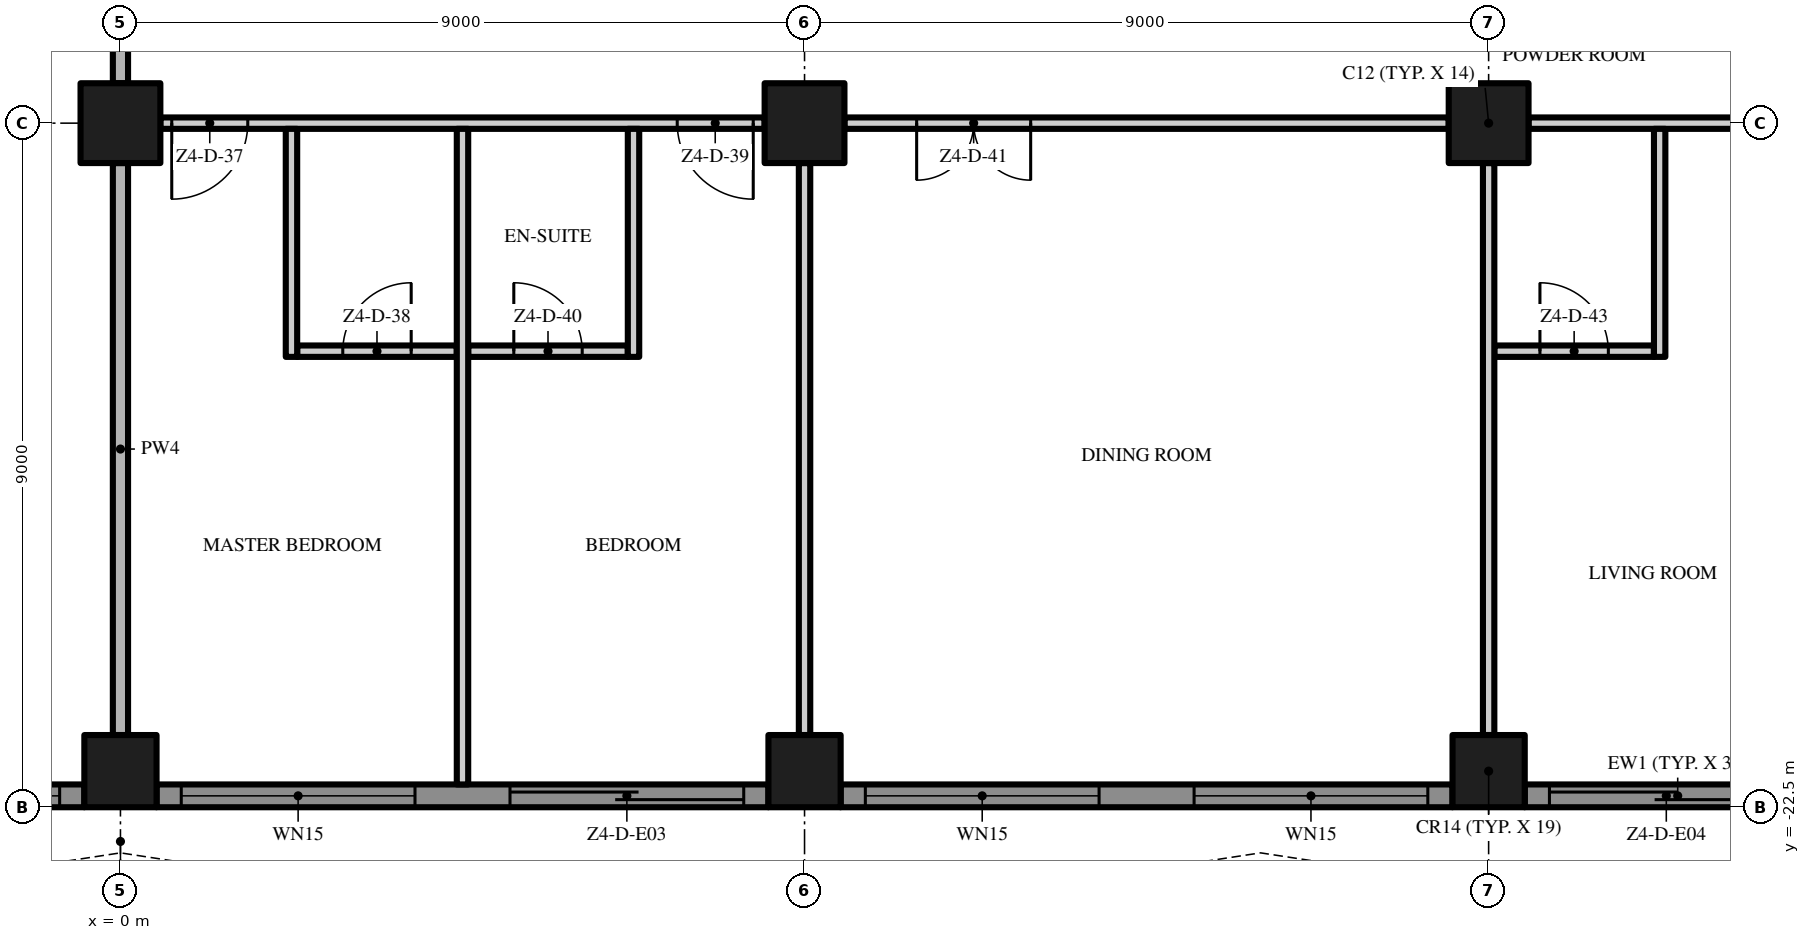
"""IFC4 building model, lengths in metres.
Left out: names, types, materials, properties, quantities, classifications, styles, units other than length and angle.
Written with IfcOpenShell. Run it as: python <this file> out.ifc"""

import sys

from ifc_helpers import new_model, si_unit, direction, frame, frame_2d, origin, origin_2d, place, context, subcontext, project, spatial, polyline, rectangle, outline, extrude, element, fill, save


model = new_model("IFC4")
c1 = context("Model", 3, precision=1e-05, world=origin(), true_north=direction((0.0, 1.0)))
c2 = subcontext(c1, "Body", "Model", "MODEL_VIEW")
j1 = project(units=[si_unit("LENGTHUNIT", "METRE"), si_unit("PLANEANGLEUNIT", "RADIAN")], contexts=[c1])
p1 = place(None, origin())
s1 = spatial("IfcSite", under=j1, at=p1, CompositionType="ELEMENT")
p2 = place(p1, origin())
s2 = spatial("IfcBuilding", under=s1, at=p2, CompositionType="ELEMENT")
p3 = place(p2, frame((0.0, 0.0, 218.6)))
s3 = spatial("IfcBuildingStorey", under=s2, at=p3, CompositionType="ELEMENT", Elevation=218.6)
p4 = place(p3, frame((0.0, -13.5, 0.0), z_axis=(0.0, 0.0, 1.0), x_axis=(1.0, 0.0, 0.0)))
e1 = element("IfcColumn", 1, at=p4, inside=s3, PredefinedType="COLUMN", context=c2, shape_type="SweptSolid", body=[
    extrude(rectangle(XDim=1.05, YDim=1.05, at=origin_2d()), origin(), (0.0, 0.0, 1.0), 3.5),
])
p5 = place(p3, frame((0.0, -22.025, 0.0), z_axis=(0.0, 0.0, 1.0), x_axis=(1.0, 0.0, 0.0)))
e2 = element("IfcColumn", 2, at=p5, inside=s3, PredefinedType="COLUMN", context=c2, shape_type="SweptSolid", body=[
    extrude(rectangle(XDim=0.95, YDim=0.95, at=origin_2d()), origin(), (0.0, 0.0, 1.0), 3.5),
])
p6 = place(p3, frame((18.0, -13.5, 0.0), z_axis=(0.0, 0.0, 1.0), x_axis=(1.0, 0.0, 0.0)))
e3 = element("IfcColumn", 3, at=p6, inside=s3, PredefinedType="COLUMN", context=c2, shape_type="SweptSolid", body=[
    extrude(rectangle(XDim=1.05, YDim=1.05, at=origin_2d()), origin(), (0.0, 0.0, 1.0), 3.5),
])
p7 = place(p3, frame((18.0, -22.025, 0.0), z_axis=(0.0, 0.0, 1.0), x_axis=(1.0, 0.0, 0.0)))
e4 = element("IfcColumn", 4, at=p7, inside=s3, PredefinedType="COLUMN", context=c2, shape_type="SweptSolid", body=[
    extrude(rectangle(XDim=0.95, YDim=0.95, at=origin_2d()), origin(), (0.0, 0.0, 1.0), 3.5),
])
p8 = place(p3, frame((9.0, -13.5, 0.0), z_axis=(0.0, 0.0, 1.0), x_axis=(1.0, 0.0, 0.0)))
e5 = element("IfcColumn", 5, at=p8, inside=s3, PredefinedType="COLUMN", context=c2, shape_type="SweptSolid", body=[
    extrude(rectangle(XDim=1.05, YDim=1.05, at=origin_2d()), origin(), (0.0, 0.0, 1.0), 3.5),
])
p9 = place(p3, frame((9.0, -22.025, 0.0), z_axis=(0.0, 0.0, 1.0), x_axis=(1.0, 0.0, 0.0)))
e6 = element("IfcColumn", 6, at=p9, inside=s3, PredefinedType="COLUMN", context=c2, shape_type="SweptSolid", body=[
    extrude(rectangle(XDim=0.95, YDim=0.95, at=origin_2d()), origin(), (0.0, 0.0, 1.0), 3.5),
])
p10 = place(p3, frame((-0.475, -22.35, 0.0), z_axis=(0.0, 0.0, 1.0), x_axis=(-1.0, 0.0, 0.0)))
e7 = element("IfcWall", 7, at=p10, inside=s3, PredefinedType="SOLIDWALL", context=c2, shape_type="SweptSolid", body=[
    extrude(rectangle(XDim=8.05, YDim=0.3, at=frame_2d((4.025, 0.0))), origin(), (0.0, 0.0, 1.0), 3.5),
])
p11 = place(p10, frame((4.65, 0.0, 0.0)))
e8 = element("IfcOpeningElement", 8, at=p11, cuts=e7, PredefinedType="OPENING", context=c2, shape_type="SweptSolid", body=[
    extrude(rectangle(XDim=3.075, YDim=2.4, at=frame_2d((1.538, 1.2))), frame((0.0, 0.16, 0.0), z_axis=(0.0, -1.0, 0.0), x_axis=(1.0, 0.0, 0.0)), (0.0, 0.0, 1.0), 0.32),
])
p12 = place(p10, frame((0.325, 0.0, 0.45)))
e9 = element("IfcOpeningElement", 9, at=p12, cuts=e7, PredefinedType="OPENING", context=c2, shape_type="SweptSolid", body=[
    extrude(rectangle(XDim=3.075, YDim=2.65, at=frame_2d((1.538, 1.325))), frame((0.0, 0.16, 0.0), z_axis=(0.0, -1.0, 0.0), x_axis=(1.0, 0.0, 0.0)), (0.0, 0.0, 1.0), 0.32),
])
p13 = place(p3, frame((8.525, -22.35, 0.0), z_axis=(0.0, 0.0, 1.0), x_axis=(-1.0, 0.0, 0.0)))
e10 = element("IfcWall", 10, at=p13, inside=s3, PredefinedType="SOLIDWALL", context=c2, shape_type="SweptSolid", body=[
    extrude(rectangle(XDim=8.05, YDim=0.3, at=frame_2d((4.025, 0.0))), origin(), (0.0, 0.0, 1.0), 3.5),
])
p14 = place(p13, frame((4.65, 0.0, 0.45)))
e11 = element("IfcOpeningElement", 11, at=p14, cuts=e10, PredefinedType="OPENING", context=c2, shape_type="SweptSolid", body=[
    extrude(rectangle(XDim=3.075, YDim=2.65, at=frame_2d((1.538, 1.325))), frame((0.0, 0.16, 0.0), z_axis=(0.0, -1.0, 0.0), x_axis=(1.0, 0.0, 0.0)), (0.0, 0.0, 1.0), 0.32),
])
p15 = place(p13, frame((0.325, 0.0, 0.0)))
e12 = element("IfcOpeningElement", 12, at=p15, cuts=e10, PredefinedType="OPENING", context=c2, shape_type="SweptSolid", body=[
    extrude(rectangle(XDim=3.075, YDim=2.4, at=frame_2d((1.538, 1.2))), frame((0.0, 0.16, 0.0), z_axis=(0.0, -1.0, 0.0), x_axis=(1.0, 0.0, 0.0)), (0.0, 0.0, 1.0), 0.32),
])
p16 = place(p3, frame((17.525, -22.35, 0.0), z_axis=(0.0, 0.0, 1.0), x_axis=(-1.0, 0.0, 0.0)))
e13 = element("IfcWall", 13, at=p16, inside=s3, PredefinedType="SOLIDWALL", context=c2, shape_type="SweptSolid", body=[
    extrude(rectangle(XDim=8.05, YDim=0.3, at=frame_2d((4.025, 0.0))), origin(), (0.0, 0.0, 1.0), 3.5),
])
p17 = place(p16, frame((4.65, 0.0, 0.45)))
e14 = element("IfcOpeningElement", 14, at=p17, cuts=e13, PredefinedType="OPENING", context=c2, shape_type="SweptSolid", body=[
    extrude(rectangle(XDim=3.075, YDim=2.65, at=frame_2d((1.538, 1.325))), frame((0.0, 0.16, 0.0), z_axis=(0.0, -1.0, 0.0), x_axis=(1.0, 0.0, 0.0)), (0.0, 0.0, 1.0), 0.32),
])
p18 = place(p16, frame((0.325, 0.0, 0.45)))
e15 = element("IfcOpeningElement", 15, at=p18, cuts=e13, PredefinedType="OPENING", context=c2, shape_type="SweptSolid", body=[
    extrude(rectangle(XDim=3.075, YDim=2.65, at=frame_2d((1.538, 1.325))), frame((0.0, 0.16, 0.0), z_axis=(0.0, -1.0, 0.0), x_axis=(1.0, 0.0, 0.0)), (0.0, 0.0, 1.0), 0.32),
])
p19 = place(p3, frame((22.5, -22.35, 0.0), z_axis=(0.0, 0.0, 1.0), x_axis=(-1.0, 0.0, 0.0)))
e16 = element("IfcWall", 16, at=p19, inside=s3, PredefinedType="SOLIDWALL", context=c2, shape_type="SweptSolid", body=[
    extrude(rectangle(XDim=4.025, YDim=0.3, at=frame_2d((2.013, 0.0))), origin(), (0.0, 0.0, 1.0), 3.5),
])
p20 = place(p19, frame((0.625, 0.0, 0.0)))
e17 = element("IfcOpeningElement", 17, at=p20, cuts=e16, PredefinedType="OPENING", context=c2, shape_type="SweptSolid", body=[
    extrude(rectangle(XDim=3.075, YDim=2.4, at=frame_2d((1.538, 1.2))), frame((0.0, 0.16, 0.0), z_axis=(0.0, -1.0, 0.0), x_axis=(1.0, 0.0, 0.0)), (0.0, 0.0, 1.0), 0.32),
])
p21 = place(p3, origin())
e18 = element("IfcWall", 18, at=p21, inside=s3, PredefinedType="USERDEFINED", context=c2, shape_type="SweptSolid", body=[
    extrude(outline(polyline([(-22.5, -25.5), (-21.0, -25.271), (-19.5, -24.671), (-18.0, -23.929), (-16.5, -23.329), (-15.0, -23.1), (-13.5, -23.329), (-12.0, -23.929), (-10.5, -24.671), (-9.0, -25.271), (-7.5, -25.5), (-6.0, -25.271), (-4.5, -24.671), (-3.0, -23.929), (-1.5, -23.329), (0.0, -23.1), (1.5, -23.329), (3.0, -23.929), (4.5, -24.671), (6.0, -25.271), (7.5, -25.5), (9.0, -25.271), (10.5, -24.671), (12.0, -23.929), (13.5, -23.329), (15.0, -23.1), (16.5, -23.329), (18.0, -23.929), (19.5, -24.671), (21.0, -25.271), (22.5, -25.5), (22.538, -25.253), (21.066, -25.028), (19.602, -24.442), (18.102, -23.701), (16.566, -23.086), (15.0, -22.847), (13.434, -23.086), (11.898, -23.701), (10.398, -24.442), (8.934, -25.028), (7.5, -25.247), (6.066, -25.028), (4.602, -24.442), (3.102, -23.701), (1.566, -23.086), (0.0, -22.847), (-1.566, -23.086), (-3.102, -23.701), (-4.602, -24.442), (-6.066, -25.028), (-7.5, -25.247), (-8.934, -25.028), (-10.398, -24.442), (-11.898, -23.701), (-13.434, -23.086), (-15.0, -22.847), (-16.566, -23.086), (-18.102, -23.701), (-19.602, -24.442), (-21.066, -25.028), (-22.538, -25.253), (-22.5, -25.5)])), origin(), (0.0, 0.0, 1.0), 0.9),
])
p22 = place(p3, frame((2.325, -16.5, 0.0), z_axis=(0.0, 0.0, 1.0), x_axis=(1.0, 0.0, 0.0)))
e19 = element("IfcWall", 19, at=p22, inside=s3, PredefinedType="PARTITIONING", context=c2, shape_type="SweptSolid", body=[
    extrude(rectangle(XDim=2.1, YDim=0.15, at=frame_2d((1.05, 0.0))), origin(), (0.0, 0.0, 1.0), 3.5),
])
p23 = place(p22, frame((0.6, 0.0, 0.0)))
e20 = element("IfcOpeningElement", 20, at=p23, cuts=e19, PredefinedType="OPENING", context=c2, shape_type="SweptSolid", body=[
    extrude(rectangle(XDim=0.9, YDim=2.1, at=frame_2d((0.45, 1.05))), frame((0.0, 0.085, 0.0), z_axis=(0.0, -1.0, 0.0), x_axis=(1.0, 0.0, 0.0)), (0.0, 0.0, 1.0), 0.17),
])
p24 = place(p3, frame((4.575, -16.5, 0.0), z_axis=(0.0, 0.0, 1.0), x_axis=(1.0, 0.0, 0.0)))
e21 = element("IfcWall", 21, at=p24, inside=s3, PredefinedType="PARTITIONING", context=c2, shape_type="SweptSolid", body=[
    extrude(rectangle(XDim=2.1, YDim=0.15, at=frame_2d((1.05, 0.0))), origin(), (0.0, 0.0, 1.0), 3.5),
])
p25 = place(p24, frame((0.6, 0.0, 0.0)))
e22 = element("IfcOpeningElement", 22, at=p25, cuts=e21, PredefinedType="OPENING", context=c2, shape_type="SweptSolid", body=[
    extrude(rectangle(XDim=0.9, YDim=2.1, at=frame_2d((0.45, 1.05))), frame((0.0, 0.085, 0.0), z_axis=(0.0, -1.0, 0.0), x_axis=(1.0, 0.0, 0.0)), (0.0, 0.0, 1.0), 0.17),
])
p26 = place(p3, frame((18.075, -16.5, 0.0), z_axis=(0.0, 0.0, 1.0), x_axis=(1.0, 0.0, 0.0)))
e23 = element("IfcWall", 23, at=p26, inside=s3, PredefinedType="PARTITIONING", context=c2, shape_type="SweptSolid", body=[
    extrude(rectangle(XDim=2.1, YDim=0.15, at=frame_2d((1.05, 0.0))), origin(), (0.0, 0.0, 1.0), 3.5),
])
p27 = place(p26, frame((0.6, 0.0, 0.0)))
e24 = element("IfcOpeningElement", 24, at=p27, cuts=e23, PredefinedType="OPENING", context=c2, shape_type="SweptSolid", body=[
    extrude(rectangle(XDim=0.9, YDim=2.1, at=frame_2d((0.45, 1.05))), frame((0.0, 0.085, 0.0), z_axis=(0.0, -1.0, 0.0), x_axis=(1.0, 0.0, 0.0)), (0.0, 0.0, 1.0), 0.17),
])
p28 = place(p3, frame((8.475, -13.5, 0.0), z_axis=(0.0, 0.0, 1.0), x_axis=(-1.0, 0.0, 0.0)))
e25 = element("IfcWall", 25, at=p28, inside=s3, PredefinedType="PARTITIONING", context=c2, shape_type="SweptSolid", body=[
    extrude(rectangle(XDim=7.95, YDim=0.15, at=frame_2d((3.975, 0.0))), origin(), (0.0, 0.0, 1.0), 3.5),
])
p29 = place(p28, frame((6.8, 0.0, 0.0)))
e26 = element("IfcOpeningElement", 26, at=p29, cuts=e25, PredefinedType="OPENING", context=c2, shape_type="SweptSolid", body=[
    extrude(rectangle(XDim=1.0, YDim=2.4, at=frame_2d((0.5, 1.2))), frame((0.0, 0.085, 0.0), z_axis=(0.0, -1.0, 0.0), x_axis=(1.0, 0.0, 0.0)), (0.0, 0.0, 1.0), 0.17),
])
p30 = place(p28, frame((0.15, 0.0, 0.0)))
e27 = element("IfcOpeningElement", 27, at=p30, cuts=e25, PredefinedType="OPENING", context=c2, shape_type="SweptSolid", body=[
    extrude(rectangle(XDim=1.0, YDim=2.4, at=frame_2d((0.5, 1.2))), frame((0.0, 0.085, 0.0), z_axis=(0.0, -1.0, 0.0), x_axis=(1.0, 0.0, 0.0)), (0.0, 0.0, 1.0), 0.17),
])
p31 = place(p3, frame((17.475, -13.5, 0.0), z_axis=(0.0, 0.0, 1.0), x_axis=(-1.0, 0.0, 0.0)))
e28 = element("IfcWall", 28, at=p31, inside=s3, PredefinedType="PARTITIONING", context=c2, shape_type="SweptSolid", body=[
    extrude(rectangle(XDim=7.95, YDim=0.15, at=frame_2d((3.975, 0.0))), origin(), (0.0, 0.0, 1.0), 3.5),
])
p32 = place(p31, frame((5.5, 0.0, 0.0)))
e29 = element("IfcOpeningElement", 29, at=p32, cuts=e28, PredefinedType="OPENING", context=c2, shape_type="SweptSolid", body=[
    extrude(rectangle(XDim=1.5, YDim=2.4, at=frame_2d((0.75, 1.2))), frame((0.0, 0.085, 0.0), z_axis=(0.0, -1.0, 0.0), x_axis=(1.0, 0.0, 0.0)), (0.0, 0.0, 1.0), 0.17),
])
p33 = place(p3, frame((26.05, -13.5, 0.0), z_axis=(0.0, 0.0, 1.0), x_axis=(-1.0, 0.0, 0.0)))
e30 = element("IfcWall", 30, at=p33, inside=s3, PredefinedType="PARTITIONING", context=c2, shape_type="SweptSolid", body=[
    extrude(rectangle(XDim=7.525, YDim=0.15, at=frame_2d((3.763, 0.0))), origin(), (0.0, 0.0, 1.0), 3.5),
])
p34 = place(p33, frame((1.55, 0.0, 0.0)))
e31 = element("IfcOpeningElement", 31, at=p34, cuts=e30, PredefinedType="OPENING", context=c2, shape_type="SweptSolid", body=[
    extrude(rectangle(XDim=1.8, YDim=2.4, at=frame_2d((0.9, 1.2))), frame((0.0, 0.085, 0.0), z_axis=(0.0, -1.0, 0.0), x_axis=(1.0, 0.0, 0.0)), (0.0, 0.0, 1.0), 0.17),
])
p35 = place(p3, frame((0.0, -21.55, 0.0), z_axis=(0.0, 0.0, 1.0), x_axis=(0.0, 1.0, 0.0)))
e32 = element("IfcWall", 32, at=p35, inside=s3, PredefinedType="PARTITIONING", context=c2, shape_type="SweptSolid", body=[
    extrude(rectangle(XDim=7.525, YDim=0.2, at=frame_2d((3.763, 0.0))), origin(), (0.0, 0.0, 1.0), 3.5),
])
p36 = place(p3, frame((0.0, -12.975, 0.0), z_axis=(0.0, 0.0, 1.0), x_axis=(0.0, 1.0, 0.0)))
e33 = element("IfcWall", 33, at=p36, inside=s3, PredefinedType="PARTITIONING", context=c2, shape_type="SweptSolid", body=[
    extrude(rectangle(XDim=7.95, YDim=0.2, at=frame_2d((3.975, 0.0))), origin(), (0.0, 0.0, 1.0), 3.5),
])
p37 = place(p3, frame((2.25, -16.575, 0.0), z_axis=(0.0, 0.0, 1.0), x_axis=(0.0, 1.0, 0.0)))
e34 = element("IfcWall", 34, at=p37, inside=s3, PredefinedType="PARTITIONING", context=c2, shape_type="SweptSolid", body=[
    extrude(rectangle(XDim=3.0, YDim=0.15, at=frame_2d((1.5, 0.0))), origin(), (0.0, 0.0, 1.0), 3.5),
])
p38 = place(p3, frame((4.5, -22.2, 0.0), z_axis=(0.0, 0.0, 1.0), x_axis=(0.0, 1.0, 0.0)))
e35 = element("IfcWall", 35, at=p38, inside=s3, PredefinedType="PARTITIONING", context=c2, shape_type="SweptSolid", body=[
    extrude(rectangle(XDim=8.625, YDim=0.15, at=frame_2d((4.312, 0.0))), origin(), (0.0, 0.0, 1.0), 3.5),
])
p39 = place(p3, frame((6.75, -16.575, 0.0), z_axis=(0.0, 0.0, 1.0), x_axis=(0.0, 1.0, 0.0)))
e36 = element("IfcWall", 36, at=p39, inside=s3, PredefinedType="PARTITIONING", context=c2, shape_type="SweptSolid", body=[
    extrude(rectangle(XDim=3.0, YDim=0.15, at=frame_2d((1.5, 0.0))), origin(), (0.0, 0.0, 1.0), 3.5),
])
for number, where, z_axis, x_axis in (
    (37, (9.0, -21.55, 0.0), (0.0, 0.0, 1.0), (0.0, 1.0, 0.0)),
    (38, (18.0, -21.55, 0.0), (0.0, 0.0, 1.0), (0.0, 1.0, 0.0)),
):
    element("IfcWall", number, at=place(p3, frame(where, z_axis=z_axis, x_axis=x_axis)), inside=s3, PredefinedType="PARTITIONING", context=c2, shape_type="SweptSolid", body=[
        extrude(rectangle(XDim=7.525, YDim=0.15, at=frame_2d((3.763, 0.0))), origin(), (0.0, 0.0, 1.0), 3.5),
    ])
p40 = place(p3, frame((20.25, -16.575, 0.0), z_axis=(0.0, 0.0, 1.0), x_axis=(0.0, 1.0, 0.0)))
e39 = element("IfcWall", 39, at=p40, inside=s3, PredefinedType="PARTITIONING", context=c2, shape_type="SweptSolid", body=[
    extrude(rectangle(XDim=3.0, YDim=0.15, at=frame_2d((1.5, 0.0))), origin(), (0.0, 0.0, 1.0), 3.5),
])
p41 = place(p12, origin())
e40 = element("IfcWindow", 40, at=p41, inside=s3, PartitioningType="SINGLE_PANEL", PredefinedType="WINDOW", context=c2, shape_type="SweptSolid", body=[
    extrude(rectangle(XDim=3.075, YDim=2.65, at=frame_2d((1.538, 1.325))), frame((0.0, 0.03, 0.0), z_axis=(0.0, -1.0, 0.0), x_axis=(1.0, 0.0, 0.0)), (0.0, 0.0, 1.0), 0.06),
])
fill(e9, e40)
p42 = place(p14, origin())
e41 = element("IfcWindow", 41, at=p42, inside=s3, PartitioningType="SINGLE_PANEL", PredefinedType="WINDOW", context=c2, shape_type="SweptSolid", body=[
    extrude(rectangle(XDim=3.075, YDim=2.65, at=frame_2d((1.538, 1.325))), frame((0.0, 0.03, 0.0), z_axis=(0.0, -1.0, 0.0), x_axis=(1.0, 0.0, 0.0)), (0.0, 0.0, 1.0), 0.06),
])
fill(e11, e41)
p43 = place(p15, origin())
e42 = element("IfcDoor", 42, at=p43, inside=s3, OperationType="SINGLE_SWING_LEFT", PredefinedType="DOOR", context=c2, shape_type="SweptSolid", body=[
    extrude(rectangle(XDim=3.075, YDim=2.4, at=frame_2d((1.538, 1.2))), frame((0.0, 0.025, 0.0), z_axis=(0.0, -1.0, 0.0), x_axis=(1.0, 0.0, 0.0)), (0.0, 0.0, 1.0), 0.05),
])
fill(e12, e42)
p44 = place(p17, origin())
e43 = element("IfcWindow", 43, at=p44, inside=s3, PartitioningType="SINGLE_PANEL", PredefinedType="WINDOW", context=c2, shape_type="SweptSolid", body=[
    extrude(rectangle(XDim=3.075, YDim=2.65, at=frame_2d((1.538, 1.325))), frame((0.0, 0.03, 0.0), z_axis=(0.0, -1.0, 0.0), x_axis=(1.0, 0.0, 0.0)), (0.0, 0.0, 1.0), 0.06),
])
fill(e14, e43)
p45 = place(p18, origin())
e44 = element("IfcWindow", 44, at=p45, inside=s3, PartitioningType="SINGLE_PANEL", PredefinedType="WINDOW", context=c2, shape_type="SweptSolid", body=[
    extrude(rectangle(XDim=3.075, YDim=2.65, at=frame_2d((1.538, 1.325))), frame((0.0, 0.03, 0.0), z_axis=(0.0, -1.0, 0.0), x_axis=(1.0, 0.0, 0.0)), (0.0, 0.0, 1.0), 0.06),
])
fill(e15, e44)
p46 = place(p20, origin())
e45 = element("IfcDoor", 45, at=p46, inside=s3, OperationType="SINGLE_SWING_LEFT", PredefinedType="DOOR", context=c2, shape_type="SweptSolid", body=[
    extrude(rectangle(XDim=3.075, YDim=2.4, at=frame_2d((1.538, 1.2))), frame((0.0, 0.025, 0.0), z_axis=(0.0, -1.0, 0.0), x_axis=(1.0, 0.0, 0.0)), (0.0, 0.0, 1.0), 0.05),
])
fill(e17, e45)
p47 = place(p29, origin())
e46 = element("IfcDoor", 46, at=p47, inside=s3, OperationType="SINGLE_SWING_RIGHT", PredefinedType="DOOR", context=c2, shape_type="SweptSolid", body=[
    extrude(rectangle(XDim=1.0, YDim=2.4, at=frame_2d((0.5, 1.2))), frame((0.0, 0.025, 0.0), z_axis=(0.0, -1.0, 0.0), x_axis=(1.0, 0.0, 0.0)), (0.0, 0.0, 1.0), 0.05),
])
fill(e26, e46)
p48 = place(p23, origin())
e47 = element("IfcDoor", 47, at=p48, inside=s3, OperationType="SINGLE_SWING_RIGHT", PredefinedType="DOOR", context=c2, shape_type="SweptSolid", body=[
    extrude(rectangle(XDim=0.9, YDim=2.1, at=frame_2d((0.45, 1.05))), frame((0.0, 0.025, 0.0), z_axis=(0.0, -1.0, 0.0), x_axis=(1.0, 0.0, 0.0)), (0.0, 0.0, 1.0), 0.05),
])
fill(e20, e47)
p49 = place(p30, origin())
e48 = element("IfcDoor", 48, at=p49, inside=s3, OperationType="SINGLE_SWING_LEFT", PredefinedType="DOOR", context=c2, shape_type="SweptSolid", body=[
    extrude(rectangle(XDim=1.0, YDim=2.4, at=frame_2d((0.5, 1.2))), frame((0.0, 0.025, 0.0), z_axis=(0.0, -1.0, 0.0), x_axis=(1.0, 0.0, 0.0)), (0.0, 0.0, 1.0), 0.05),
])
fill(e27, e48)
p50 = place(p25, origin())
e49 = element("IfcDoor", 49, at=p50, inside=s3, OperationType="SINGLE_SWING_LEFT", PredefinedType="DOOR", context=c2, shape_type="SweptSolid", body=[
    extrude(rectangle(XDim=0.9, YDim=2.1, at=frame_2d((0.45, 1.05))), frame((0.0, 0.025, 0.0), z_axis=(0.0, -1.0, 0.0), x_axis=(1.0, 0.0, 0.0)), (0.0, 0.0, 1.0), 0.05),
])
fill(e22, e49)
p51 = place(p32, origin())
e50 = element("IfcDoor", 50, at=p51, inside=s3, OperationType="DOUBLE_DOOR_SINGLE_SWING", PredefinedType="DOOR", context=c2, shape_type="SweptSolid", body=[
    extrude(rectangle(XDim=1.5, YDim=2.4, at=frame_2d((0.75, 1.2))), frame((0.0, 0.025, 0.0), z_axis=(0.0, -1.0, 0.0), x_axis=(1.0, 0.0, 0.0)), (0.0, 0.0, 1.0), 0.05),
])
fill(e29, e50)
p52 = place(p27, origin())
e51 = element("IfcDoor", 51, at=p52, inside=s3, OperationType="SINGLE_SWING_LEFT", PredefinedType="DOOR", context=c2, shape_type="SweptSolid", body=[
    extrude(rectangle(XDim=0.9, YDim=2.1, at=frame_2d((0.45, 1.05))), frame((0.0, 0.025, 0.0), z_axis=(0.0, -1.0, 0.0), x_axis=(1.0, 0.0, 0.0)), (0.0, 0.0, 1.0), 0.05),
])
fill(e24, e51)
save(model, sys.argv[1])
